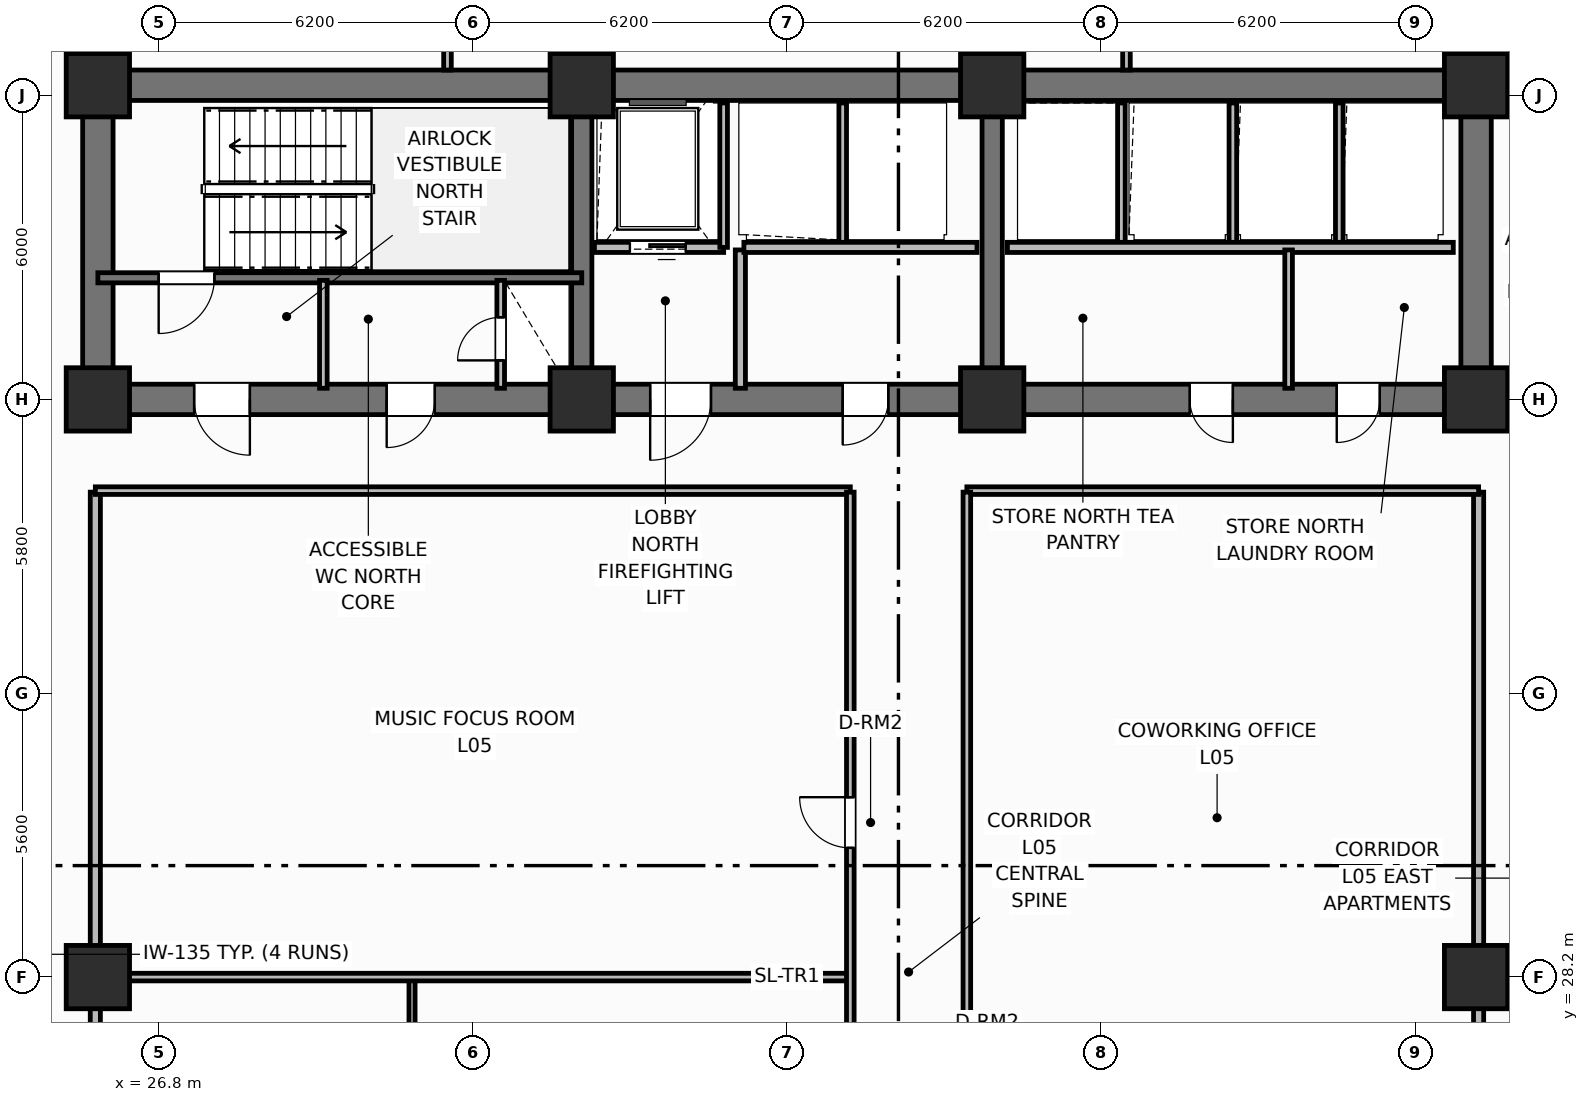
"""IFC4 building model, lengths in metres.
Left out: names, types, materials, properties, quantities, classifications, styles, units other than length and angle.
Written with IfcOpenShell. Run it as: python <this file> out.ifc"""

import sys

from ifc_helpers import new_model, si_unit, direction, frame, frame_2d, origin, origin_2d, place, context, subcontext, project, spatial, rectangle, extrude, element, fill, save


model = new_model("IFC4")
c1 = context("Model", 3, precision=1e-05, world=origin(), true_north=direction((0.0, 1.0)))
c2 = subcontext(c1, "Body", "Model", "MODEL_VIEW")
j1 = project(units=[si_unit("LENGTHUNIT", "METRE"), si_unit("PLANEANGLEUNIT", "RADIAN")], contexts=[c1])
p1 = place(None, origin())
s1 = spatial("IfcSite", under=j1, at=p1, CompositionType="ELEMENT")
p2 = place(p1, origin())
s2 = spatial("IfcBuilding", under=s1, at=p2, CompositionType="ELEMENT")
p3 = place(p2, frame((0.0, 0.0, 24.6)))
s3 = spatial("IfcBuildingStorey", under=s2, at=p3, CompositionType="ELEMENT", Elevation=24.6)
p4 = place(p3, frame((25.6, 45.8, 0.0), z_axis=(0.0, 0.0, 1.0), x_axis=(1.0, 0.0, 0.0)))
e1 = element("IfcWall", 1, at=p4, inside=s3, PredefinedType="SHEAR", context=c2, shape_type="SweptSolid", body=[
    extrude(rectangle(XDim=27.2, YDim=0.6, at=frame_2d((13.6, 0.0))), origin(), (0.0, 0.0, 1.0), 4.2),
])
for number, where, z_axis, x_axis in (
    (2, (25.6, 39.9, 0.0), (0.0, 0.0, 1.0), (0.0, 1.0, 0.0)),
    (3, (52.8, 39.9, 0.0), (0.0, 0.0, 1.0), (0.0, 1.0, 0.0)),
):
    element("IfcWall", number, at=place(p3, frame(where, z_axis=z_axis, x_axis=x_axis)), inside=s3, PredefinedType="SHEAR", context=c2, shape_type="SweptSolid", body=[
        extrude(rectangle(XDim=5.6, YDim=0.6, at=frame_2d((2.8, 0.0))), origin(), (0.0, 0.0, 1.0), 4.2),
    ])
p5 = place(p3, frame((52.8, 39.6, 0.0), z_axis=(0.0, 0.0, 1.0), x_axis=(-1.0, 0.0, 0.0)))
e4 = element("IfcWall", 4, at=p5, inside=s3, PredefinedType="SHEAR", context=c2, shape_type="SweptSolid", body=[
    extrude(rectangle(XDim=27.2, YDim=0.6, at=frame_2d((13.6, 0.0))), origin(), (0.0, 0.0, 1.0), 4.2),
])
p6 = place(p5, frame((24.2, 0.0, 0.0)))
e5 = element("IfcOpeningElement", 5, at=p6, cuts=e4, PredefinedType="OPENING", context=c2, shape_type="SweptSolid", body=[
    extrude(rectangle(XDim=1.1, YDim=2.15, at=frame_2d((0.55, 1.075))), frame((0.0, 0.31, 0.0), z_axis=(0.0, -1.0, 0.0), x_axis=(1.0, 0.0, 0.0)), (0.0, 0.0, 1.0), 0.62),
])
p7 = place(p5, frame((20.55, 0.0, 0.0)))
e6 = element("IfcOpeningElement", 6, at=p7, cuts=e4, PredefinedType="OPENING", context=c2, shape_type="SweptSolid", body=[
    extrude(rectangle(XDim=0.95, YDim=2.1, at=frame_2d((0.475, 1.05))), frame((0.0, 0.31, 0.0), z_axis=(0.0, -1.0, 0.0), x_axis=(1.0, 0.0, 0.0)), (0.0, 0.0, 1.0), 0.62),
])
p8 = place(p5, frame((15.1, 0.0, 0.0)))
e7 = element("IfcOpeningElement", 7, at=p8, cuts=e4, PredefinedType="OPENING", context=c2, shape_type="SweptSolid", body=[
    extrude(rectangle(XDim=1.2, YDim=2.15, at=frame_2d((0.6, 1.075))), frame((0.0, 0.31, 0.0), z_axis=(0.0, -1.0, 0.0), x_axis=(1.0, 0.0, 0.0)), (0.0, 0.0, 1.0), 0.62),
])
p9 = place(p5, frame((11.6, 0.0, 0.0)))
e8 = element("IfcOpeningElement", 8, at=p9, cuts=e4, PredefinedType="OPENING", context=c2, shape_type="SweptSolid", body=[
    extrude(rectangle(XDim=0.9, YDim=2.1, at=frame_2d((0.45, 1.05))), frame((0.0, 0.31, 0.0), z_axis=(0.0, -1.0, 0.0), x_axis=(1.0, 0.0, 0.0)), (0.0, 0.0, 1.0), 0.62),
])
p10 = place(p5, frame((4.8, 0.0, 0.0)))
e9 = element("IfcOpeningElement", 9, at=p10, cuts=e4, PredefinedType="OPENING", context=c2, shape_type="SweptSolid", body=[
    extrude(rectangle(XDim=0.85, YDim=2.1, at=frame_2d((0.425, 1.05))), frame((0.0, 0.31, 0.0), z_axis=(0.0, -1.0, 0.0), x_axis=(1.0, 0.0, 0.0)), (0.0, 0.0, 1.0), 0.62),
])
p11 = place(p5, frame((1.9, 0.0, 0.0)))
e10 = element("IfcOpeningElement", 10, at=p11, cuts=e4, PredefinedType="OPENING", context=c2, shape_type="SweptSolid", body=[
    extrude(rectangle(XDim=0.85, YDim=2.1, at=frame_2d((0.425, 1.05))), frame((0.0, 0.31, 0.0), z_axis=(0.0, -1.0, 0.0), x_axis=(1.0, 0.0, 0.0)), (0.0, 0.0, 1.0), 0.62),
])
for number, where, z_axis, x_axis in (
    (11, (35.15, 39.9, 0.0), (0.0, 0.0, 1.0), (0.0, 1.0, 0.0)),
    (12, (43.25, 39.9, 0.0), (0.0, 0.0, 1.0), (0.0, 1.0, 0.0)),
):
    element("IfcWall", number, at=place(p3, frame(where, z_axis=z_axis, x_axis=x_axis)), inside=s3, PredefinedType="SHEAR", context=c2, shape_type="SweptSolid", body=[
        extrude(rectangle(XDim=5.6, YDim=0.4, at=frame_2d((2.8, 0.0))), origin(), (0.0, 0.0, 1.0), 4.2),
    ])
for number, where, z_axis, x_axis in (
    (13, (25.6, 39.6, 0.0), (0.0, 0.0, 1.0), (1.0, 0.0, 0.0)),
    (14, (25.6, 45.8, 0.0), (0.0, 0.0, 1.0), (1.0, 0.0, 0.0)),
    (15, (35.15, 39.6, 0.0), (0.0, 0.0, 1.0), (1.0, 0.0, 0.0)),
    (16, (35.15, 45.8, 0.0), (0.0, 0.0, 1.0), (1.0, 0.0, 0.0)),
    (17, (43.25, 39.6, 0.0), (0.0, 0.0, 1.0), (1.0, 0.0, 0.0)),
    (18, (43.25, 45.8, 0.0), (0.0, 0.0, 1.0), (1.0, 0.0, 0.0)),
    (19, (52.8, 39.6, 0.0), (0.0, 0.0, 1.0), (1.0, 0.0, 0.0)),
    (20, (52.8, 45.8, 0.0), (0.0, 0.0, 1.0), (1.0, 0.0, 0.0)),
    (21, (25.6, 28.2, 0.0), (0.0, 0.0, 1.0), (1.0, 0.0, 0.0)),
    (22, (52.8, 28.2, 0.0), (0.0, 0.0, 1.0), (1.0, 0.0, 0.0)),
):
    element("IfcColumn", number, at=place(p3, frame(where, z_axis=z_axis, x_axis=x_axis)), inside=s3, PredefinedType="COLUMN", context=c2, shape_type="SweptSolid", body=[
        extrude(rectangle(XDim=1.25, YDim=1.25, at=origin_2d()), origin(), (0.0, 0.0, 1.0), 4.2),
    ])
p12 = place(p3, frame((35.15, 42.0, 0.0), z_axis=(0.0, 0.0, 1.0), x_axis=(-1.0, 0.0, 0.0)))
e23 = element("IfcWall", 23, at=p12, inside=s3, PredefinedType="SHEAR", context=c2, shape_type="SweptSolid", body=[
    extrude(rectangle(XDim=9.55, YDim=0.2, at=frame_2d((4.775, 0.0))), origin(), (0.0, 0.0, 1.0), 4.2),
])
p13 = place(p12, frame((7.25, 0.0, 0.0)))
e24 = element("IfcOpeningElement", 24, at=p13, cuts=e23, PredefinedType="OPENING", context=c2, shape_type="SweptSolid", body=[
    extrude(rectangle(XDim=1.1, YDim=2.15, at=frame_2d((0.55, 1.075))), frame((0.0, 0.11, 0.0), z_axis=(0.0, -1.0, 0.0), x_axis=(1.0, 0.0, 0.0)), (0.0, 0.0, 1.0), 0.22),
])
p14 = place(p3, frame((33.55, 39.82, 0.0), z_axis=(0.0, 0.0, 1.0), x_axis=(0.0, 1.0, 0.0)))
e25 = element("IfcWall", 25, at=p14, inside=s3, PredefinedType="PARTITIONING", context=c2, shape_type="SweptSolid", body=[
    extrude(rectangle(XDim=2.13, YDim=0.15, at=frame_2d((1.065, 0.0))), origin(), (0.0, 0.0, 1.0), 3.03),
])
p15 = place(p14, frame((0.55, 0.0, 0.0)))
e26 = element("IfcOpeningElement", 26, at=p15, cuts=e25, PredefinedType="OPENING", context=c2, shape_type="SweptSolid", body=[
    extrude(rectangle(XDim=0.85, YDim=2.05, at=frame_2d((0.425, 1.025))), frame((0.0, 0.085, 0.0), z_axis=(0.0, -1.0, 0.0), x_axis=(1.0, 0.0, 0.0)), (0.0, 0.0, 1.0), 0.17),
])
p16 = place(p3, frame((30.05, 39.82, 0.0), z_axis=(0.0, 0.0, 1.0), x_axis=(0.0, 1.0, 0.0)))
e27 = element("IfcWall", 27, at=p16, inside=s3, PredefinedType="PARTITIONING", context=c2, shape_type="SweptSolid", body=[
    extrude(rectangle(XDim=2.13, YDim=0.15, at=frame_2d((1.065, 0.0))), origin(), (0.0, 0.0, 1.0), 3.03),
])
p17 = place(p3, frame((37.95, 42.6, 0.0), z_axis=(0.0, 0.0, 1.0), x_axis=(-1.0, 0.0, 0.0)))
e28 = element("IfcWall", 28, at=p17, inside=s3, PredefinedType="PARTITIONING", context=c2, shape_type="SweptSolid", body=[
    extrude(rectangle(XDim=2.55, YDim=0.2, at=frame_2d((1.275, 0.0))), origin(), (0.0, 0.0, 1.0), 2.8),
])
p18 = place(p17, frame((0.75, 0.0, 0.0)))
e29 = element("IfcOpeningElement", 29, at=p18, cuts=e28, PredefinedType="OPENING", context=c2, shape_type="SweptSolid", body=[
    extrude(rectangle(XDim=1.1, YDim=2.15, at=frame_2d((0.55, 1.075))), frame((0.0, 0.11, 0.0), z_axis=(0.0, -1.0, 0.0), x_axis=(1.0, 0.0, 0.0)), (0.0, 0.0, 1.0), 0.22),
])
p19 = place(p3, frame((37.95, 42.6, 0.0), z_axis=(0.0, 0.0, 1.0), x_axis=(0.0, 1.0, 0.0)))
e30 = element("IfcWall", 30, at=p19, inside=s3, PredefinedType="PARTITIONING", context=c2, shape_type="SweptSolid", body=[
    extrude(rectangle(XDim=2.85, YDim=0.15, at=frame_2d((1.425, 0.0))), origin(), (0.0, 0.0, 1.0), 3.03),
])
p20 = place(p3, frame((38.28, 39.82, 0.0), z_axis=(0.0, 0.0, 1.0), x_axis=(0.0, 1.0, 0.0)))
e31 = element("IfcWall", 31, at=p20, inside=s3, PredefinedType="PARTITIONING", context=c2, shape_type="SweptSolid", body=[
    extrude(rectangle(XDim=2.73, YDim=0.2, at=frame_2d((1.365, 0.0))), origin(), (0.0, 0.0, 1.0), 3.03),
])
p21 = place(p3, frame((40.3, 42.65, 0.0), z_axis=(0.0, 0.0, 1.0), x_axis=(0.0, 1.0, 0.0)))
e32 = element("IfcWall", 32, at=p21, inside=s3, PredefinedType="PARTITIONING", context=c2, shape_type="SweptSolid", body=[
    extrude(rectangle(XDim=2.8, YDim=0.15, at=frame_2d((1.4, 0.0))), origin(), (0.0, 0.0, 1.0), 3.03),
])
p22 = place(p3, frame((42.95, 42.6, 0.0), z_axis=(0.0, 0.0, 1.0), x_axis=(-1.0, 0.0, 0.0)))
e33 = element("IfcWall", 33, at=p22, inside=s3, PredefinedType="PARTITIONING", context=c2, shape_type="SweptSolid", body=[
    extrude(rectangle(XDim=4.6, YDim=0.2, at=frame_2d((2.3, 0.0))), origin(), (0.0, 0.0, 1.0), 2.8),
])
for number, where, z_axis, x_axis in (
    (34, (45.8, 42.65, 0.0), (0.0, 0.0, 1.0), (0.0, 1.0, 0.0)),
    (35, (48.0, 42.65, 0.0), (0.0, 0.0, 1.0), (0.0, 1.0, 0.0)),
    (36, (50.1, 42.65, 0.0), (0.0, 0.0, 1.0), (0.0, 1.0, 0.0)),
):
    element("IfcWall", number, at=place(p3, frame(where, z_axis=z_axis, x_axis=x_axis)), inside=s3, PredefinedType="PARTITIONING", context=c2, shape_type="SweptSolid", body=[
        extrude(rectangle(XDim=2.8, YDim=0.15, at=frame_2d((1.4, 0.0))), origin(), (0.0, 0.0, 1.0), 3.03),
    ])
p23 = place(p3, frame((52.35, 42.6, 0.0), z_axis=(0.0, 0.0, 1.0), x_axis=(-1.0, 0.0, 0.0)))
e37 = element("IfcWall", 37, at=p23, inside=s3, PredefinedType="PARTITIONING", context=c2, shape_type="SweptSolid", body=[
    extrude(rectangle(XDim=8.8, YDim=0.2, at=frame_2d((4.4, 0.0))), origin(), (0.0, 0.0, 1.0), 3.03),
])
p24 = place(p3, frame((49.1, 39.82, 0.0), z_axis=(0.0, 0.0, 1.0), x_axis=(0.0, 1.0, 0.0)))
e38 = element("IfcWall", 38, at=p24, inside=s3, PredefinedType="PARTITIONING", context=c2, shape_type="SweptSolid", body=[
    extrude(rectangle(XDim=2.73, YDim=0.15, at=frame_2d((1.365, 0.0))), origin(), (0.0, 0.0, 1.0), 3.03),
])
for number, where, z_axis, x_axis in (
    (39, (25.55, 19.35, 0.0), (0.0, 0.0, 1.0), (0.0, 1.0, 0.0)),
    (40, (52.85, 19.35, 0.0), (0.0, 0.0, 1.0), (0.0, 1.0, 0.0)),
):
    element("IfcWall", number, at=place(p3, frame(where, z_axis=z_axis, x_axis=x_axis)), inside=s3, PredefinedType="PARTITIONING", context=c2, shape_type="SweptSolid", body=[
        extrude(rectangle(XDim=18.42, YDim=0.2, at=frame_2d((9.21, 0.0))), origin(), (0.0, 0.0, 1.0), 3.03),
    ])
p25 = place(p3, frame((25.55, 37.8, 0.0), z_axis=(0.0, 0.0, 1.0), x_axis=(1.0, 0.0, 0.0)))
e41 = element("IfcWall", 41, at=p25, inside=s3, PredefinedType="PARTITIONING", context=c2, shape_type="SweptSolid", body=[
    extrude(rectangle(XDim=14.9, YDim=0.15, at=frame_2d((7.45, 0.0))), origin(), (0.0, 0.0, 1.0), 3.03),
])
p26 = place(p3, frame((42.75, 37.8, 0.0), z_axis=(0.0, 0.0, 1.0), x_axis=(1.0, 0.0, 0.0)))
e42 = element("IfcWall", 42, at=p26, inside=s3, PredefinedType="PARTITIONING", context=c2, shape_type="SweptSolid", body=[
    extrude(rectangle(XDim=10.1, YDim=0.15, at=frame_2d((5.05, 0.0))), origin(), (0.0, 0.0, 1.0), 3.03),
])
p27 = place(p3, frame((31.8, 19.38, 0.0), z_axis=(0.0, 0.0, 1.0), x_axis=(0.0, 1.0, 0.0)))
e43 = element("IfcWall", 43, at=p27, inside=s3, PredefinedType="PARTITIONING", context=c2, shape_type="SweptSolid", body=[
    extrude(rectangle(XDim=8.77, YDim=0.12, at=frame_2d((4.385, 0.0))), origin(), (0.0, 0.0, 1.0), 3.03),
])
p28 = place(p27, frame((2.2, 0.0, 0.0)))
e44 = element("IfcOpeningElement", 44, at=p28, cuts=e43, PredefinedType="OPENING", context=c2, shape_type="SweptSolid", body=[
    extrude(rectangle(XDim=0.9, YDim=2.1, at=frame_2d((0.45, 1.05))), frame((0.0, 0.07, 0.0), z_axis=(0.0, -1.0, 0.0), x_axis=(1.0, 0.0, 0.0)), (0.0, 0.0, 1.0), 0.14),
])
p29 = place(p3, frame((25.6, 28.2, 0.0), z_axis=(0.0, 0.0, 1.0), x_axis=(1.0, 0.0, 0.0)))
e45 = element("IfcWall", 45, at=p29, inside=s3, PredefinedType="PARTITIONING", context=c2, shape_type="SweptSolid", body=[
    extrude(rectangle(XDim=14.87, YDim=0.15, at=frame_2d((7.435, 0.0))), origin(), (0.0, 0.0, 1.0), 3.03),
])
p30 = place(p3, frame((40.45, 19.35, 0.0), z_axis=(0.0, 0.0, 1.0), x_axis=(0.0, 1.0, 0.0)))
e46 = element("IfcWall", 46, at=p30, inside=s3, PredefinedType="PARTITIONING", context=c2, shape_type="SweptSolid", body=[
    extrude(rectangle(XDim=18.42, YDim=0.15, at=frame_2d((9.21, 0.0))), origin(), (0.0, 0.0, 1.0), 3.03),
])
p31 = place(p30, frame((2.4, 0.0, 0.0)))
e47 = element("IfcOpeningElement", 47, at=p31, cuts=e46, PredefinedType="OPENING", context=c2, shape_type="SweptSolid", body=[
    extrude(rectangle(XDim=1.0, YDim=2.15, at=frame_2d((0.5, 1.075))), frame((0.0, 0.085, 0.0), z_axis=(0.0, -1.0, 0.0), x_axis=(1.0, 0.0, 0.0)), (0.0, 0.0, 1.0), 0.17),
])
p32 = place(p30, frame((11.4, 0.0, 0.0)))
e48 = element("IfcOpeningElement", 48, at=p32, cuts=e46, PredefinedType="OPENING", context=c2, shape_type="SweptSolid", body=[
    extrude(rectangle(XDim=1.0, YDim=2.15, at=frame_2d((0.5, 1.075))), frame((0.0, 0.085, 0.0), z_axis=(0.0, -1.0, 0.0), x_axis=(1.0, 0.0, 0.0)), (0.0, 0.0, 1.0), 0.17),
])
p33 = place(p3, frame((42.75, 19.35, 0.0), z_axis=(0.0, 0.0, 1.0), x_axis=(0.0, 1.0, 0.0)))
e49 = element("IfcWall", 49, at=p33, inside=s3, PredefinedType="PARTITIONING", context=c2, shape_type="SweptSolid", body=[
    extrude(rectangle(XDim=18.42, YDim=0.15, at=frame_2d((9.21, 0.0))), origin(), (0.0, 0.0, 1.0), 3.03),
])
p34 = place(p33, frame((5.5, 0.0, 0.0)))
e50 = element("IfcOpeningElement", 50, at=p34, cuts=e49, PredefinedType="OPENING", context=c2, shape_type="SweptSolid", body=[
    extrude(rectangle(XDim=1.0, YDim=2.15, at=frame_2d((0.5, 1.075))), frame((0.0, 0.085, 0.0), z_axis=(0.0, -1.0, 0.0), x_axis=(1.0, 0.0, 0.0)), (0.0, 0.0, 1.0), 0.17),
])
p35 = place(p3, frame((32.5, 46.1, 0.0), z_axis=(0.0, 0.0, 1.0), x_axis=(0.0, 1.0, 0.0)))
e51 = element("IfcWall", 51, at=p35, inside=s3, PredefinedType="PARTITIONING", context=c2, shape_type="SweptSolid", body=[
    extrude(rectangle(XDim=5.33, YDim=0.15, at=frame_2d((2.665, 0.0))), origin(), (0.0, 0.0, 1.0), 3.03),
])
p36 = place(p35, frame((0.85, 0.0, 0.0)))
e52 = element("IfcOpeningElement", 52, at=p36, cuts=e51, PredefinedType="OPENING", context=c2, shape_type="SweptSolid", body=[
    extrude(rectangle(XDim=0.9, YDim=2.1, at=frame_2d((0.45, 1.05))), frame((0.0, 0.085, 0.0), z_axis=(0.0, -1.0, 0.0), x_axis=(1.0, 0.0, 0.0)), (0.0, 0.0, 1.0), 0.17),
])
p37 = place(p3, frame((45.9, 46.1, 0.0), z_axis=(0.0, 0.0, 1.0), x_axis=(0.0, 1.0, 0.0)))
e53 = element("IfcWall", 53, at=p37, inside=s3, PredefinedType="PARTITIONING", context=c2, shape_type="SweptSolid", body=[
    extrude(rectangle(XDim=5.33, YDim=0.15, at=frame_2d((2.665, 0.0))), origin(), (0.0, 0.0, 1.0), 3.03),
])
p38 = place(p3, frame((25.4, 46.1, 0.0), z_axis=(0.0, 0.0, 1.0), x_axis=(0.0, 1.0, 0.0)))
e54 = element("IfcWall", 54, at=p38, inside=s3, PredefinedType="PARTITIONING", context=c2, shape_type="SweptSolid", body=[
    extrude(rectangle(XDim=4.83, YDim=0.2, at=frame_2d((2.415, 0.0))), origin(), (0.0, 0.0, 1.0), 3.03),
])
p39 = place(p38, frame((1.05, 0.0, 0.0)))
e55 = element("IfcOpeningElement", 55, at=p39, cuts=e54, PredefinedType="OPENING", context=c2, shape_type="SweptSolid", body=[
    extrude(rectangle(XDim=0.9, YDim=2.1, at=frame_2d((0.45, 1.05))), frame((0.0, 0.11, 0.0), z_axis=(0.0, -1.0, 0.0), x_axis=(1.0, 0.0, 0.0)), (0.0, 0.0, 1.0), 0.22),
])
p40 = place(p3, frame((53.0, 46.1, 0.0), z_axis=(0.0, 0.0, 1.0), x_axis=(0.0, 1.0, 0.0)))
e56 = element("IfcWall", 56, at=p40, inside=s3, PredefinedType="PARTITIONING", context=c2, shape_type="SweptSolid", body=[
    extrude(rectangle(XDim=4.83, YDim=0.2, at=frame_2d((2.415, 0.0))), origin(), (0.0, 0.0, 1.0), 3.03),
])
p41 = place(p40, frame((1.05, 0.0, 0.0)))
e57 = element("IfcOpeningElement", 57, at=p41, cuts=e56, PredefinedType="OPENING", context=c2, shape_type="SweptSolid", body=[
    extrude(rectangle(XDim=0.9, YDim=2.1, at=frame_2d((0.45, 1.05))), frame((0.0, 0.11, 0.0), z_axis=(0.0, -1.0, 0.0), x_axis=(1.0, 0.0, 0.0)), (0.0, 0.0, 1.0), 0.22),
])
p42 = place(p13, origin())
e58 = element("IfcDoor", 58, at=p42, inside=s3, OperationType="SINGLE_SWING_RIGHT", PredefinedType="DOOR", context=c2, shape_type="SweptSolid", body=[
    extrude(rectangle(XDim=1.1, YDim=2.15, at=frame_2d((0.55, 1.075))), frame((0.0, 0.025, 0.0), z_axis=(0.0, -1.0, 0.0), x_axis=(1.0, 0.0, 0.0)), (0.0, 0.0, 1.0), 0.05),
])
fill(e24, e58)
p43 = place(p15, origin())
e59 = element("IfcDoor", 59, at=p43, inside=s3, OperationType="SINGLE_SWING_LEFT", PredefinedType="TRAPDOOR", context=c2, shape_type="SweptSolid", body=[
    extrude(rectangle(XDim=0.85, YDim=2.05, at=frame_2d((0.425, 1.025))), frame((0.0, 0.025, 0.0), z_axis=(0.0, -1.0, 0.0), x_axis=(1.0, 0.0, 0.0)), (0.0, 0.0, 1.0), 0.05),
])
fill(e26, e59)
p44 = place(p18, origin())
e60 = element("IfcDoor", 60, at=p44, inside=s3, OperationType="SLIDING_TO_LEFT", PredefinedType="DOOR", context=c2, shape_type="SweptSolid", body=[
    extrude(rectangle(XDim=1.1, YDim=2.15, at=frame_2d((0.55, 1.075))), frame((0.0, 0.025, 0.0), z_axis=(0.0, -1.0, 0.0), x_axis=(1.0, 0.0, 0.0)), (0.0, 0.0, 1.0), 0.05),
])
fill(e29, e60)
p45 = place(p32, origin())
e61 = element("IfcDoor", 61, at=p45, inside=s3, OperationType="SINGLE_SWING_RIGHT", PredefinedType="DOOR", context=c2, shape_type="SweptSolid", body=[
    extrude(rectangle(XDim=1.0, YDim=2.15, at=frame_2d((0.5, 1.075))), frame((0.0, 0.025, 0.0), z_axis=(0.0, -1.0, 0.0), x_axis=(1.0, 0.0, 0.0)), (0.0, 0.0, 1.0), 0.05),
])
fill(e48, e61)
p46 = place(p6, origin())
e62 = element("IfcDoor", 62, at=p46, inside=s3, OperationType="SINGLE_SWING_LEFT", PredefinedType="DOOR", context=c2, shape_type="SweptSolid", body=[
    extrude(rectangle(XDim=1.1, YDim=2.15, at=frame_2d((0.55, 1.075))), frame((0.0, 0.025, 0.0), z_axis=(0.0, -1.0, 0.0), x_axis=(1.0, 0.0, 0.0)), (0.0, 0.0, 1.0), 0.05),
])
fill(e5, e62)
p47 = place(p7, origin())
e63 = element("IfcDoor", 63, at=p47, inside=s3, OperationType="SINGLE_SWING_RIGHT", PredefinedType="DOOR", context=c2, shape_type="SweptSolid", body=[
    extrude(rectangle(XDim=0.95, YDim=2.1, at=frame_2d((0.475, 1.05))), frame((0.0, 0.025, 0.0), z_axis=(0.0, -1.0, 0.0), x_axis=(1.0, 0.0, 0.0)), (0.0, 0.0, 1.0), 0.05),
])
fill(e6, e63)
p48 = place(p8, origin())
e64 = element("IfcDoor", 64, at=p48, inside=s3, OperationType="SINGLE_SWING_RIGHT", PredefinedType="DOOR", context=c2, shape_type="SweptSolid", body=[
    extrude(rectangle(XDim=1.2, YDim=2.15, at=frame_2d((0.6, 1.075))), frame((0.0, 0.025, 0.0), z_axis=(0.0, -1.0, 0.0), x_axis=(1.0, 0.0, 0.0)), (0.0, 0.0, 1.0), 0.05),
])
fill(e7, e64)
p49 = place(p9, origin())
e65 = element("IfcDoor", 65, at=p49, inside=s3, OperationType="SINGLE_SWING_RIGHT", PredefinedType="DOOR", context=c2, shape_type="SweptSolid", body=[
    extrude(rectangle(XDim=0.9, YDim=2.1, at=frame_2d((0.45, 1.05))), frame((0.0, 0.025, 0.0), z_axis=(0.0, -1.0, 0.0), x_axis=(1.0, 0.0, 0.0)), (0.0, 0.0, 1.0), 0.05),
])
fill(e8, e65)
p50 = place(p10, origin())
e66 = element("IfcDoor", 66, at=p50, inside=s3, OperationType="SINGLE_SWING_LEFT", PredefinedType="DOOR", context=c2, shape_type="SweptSolid", body=[
    extrude(rectangle(XDim=0.85, YDim=2.1, at=frame_2d((0.425, 1.05))), frame((0.0, 0.025, 0.0), z_axis=(0.0, -1.0, 0.0), x_axis=(1.0, 0.0, 0.0)), (0.0, 0.0, 1.0), 0.05),
])
fill(e9, e66)
p51 = place(p11, origin())
e67 = element("IfcDoor", 67, at=p51, inside=s3, OperationType="SINGLE_SWING_RIGHT", PredefinedType="DOOR", context=c2, shape_type="SweptSolid", body=[
    extrude(rectangle(XDim=0.85, YDim=2.1, at=frame_2d((0.425, 1.05))), frame((0.0, 0.025, 0.0), z_axis=(0.0, -1.0, 0.0), x_axis=(1.0, 0.0, 0.0)), (0.0, 0.0, 1.0), 0.05),
])
fill(e10, e67)
save(model, sys.argv[1])
